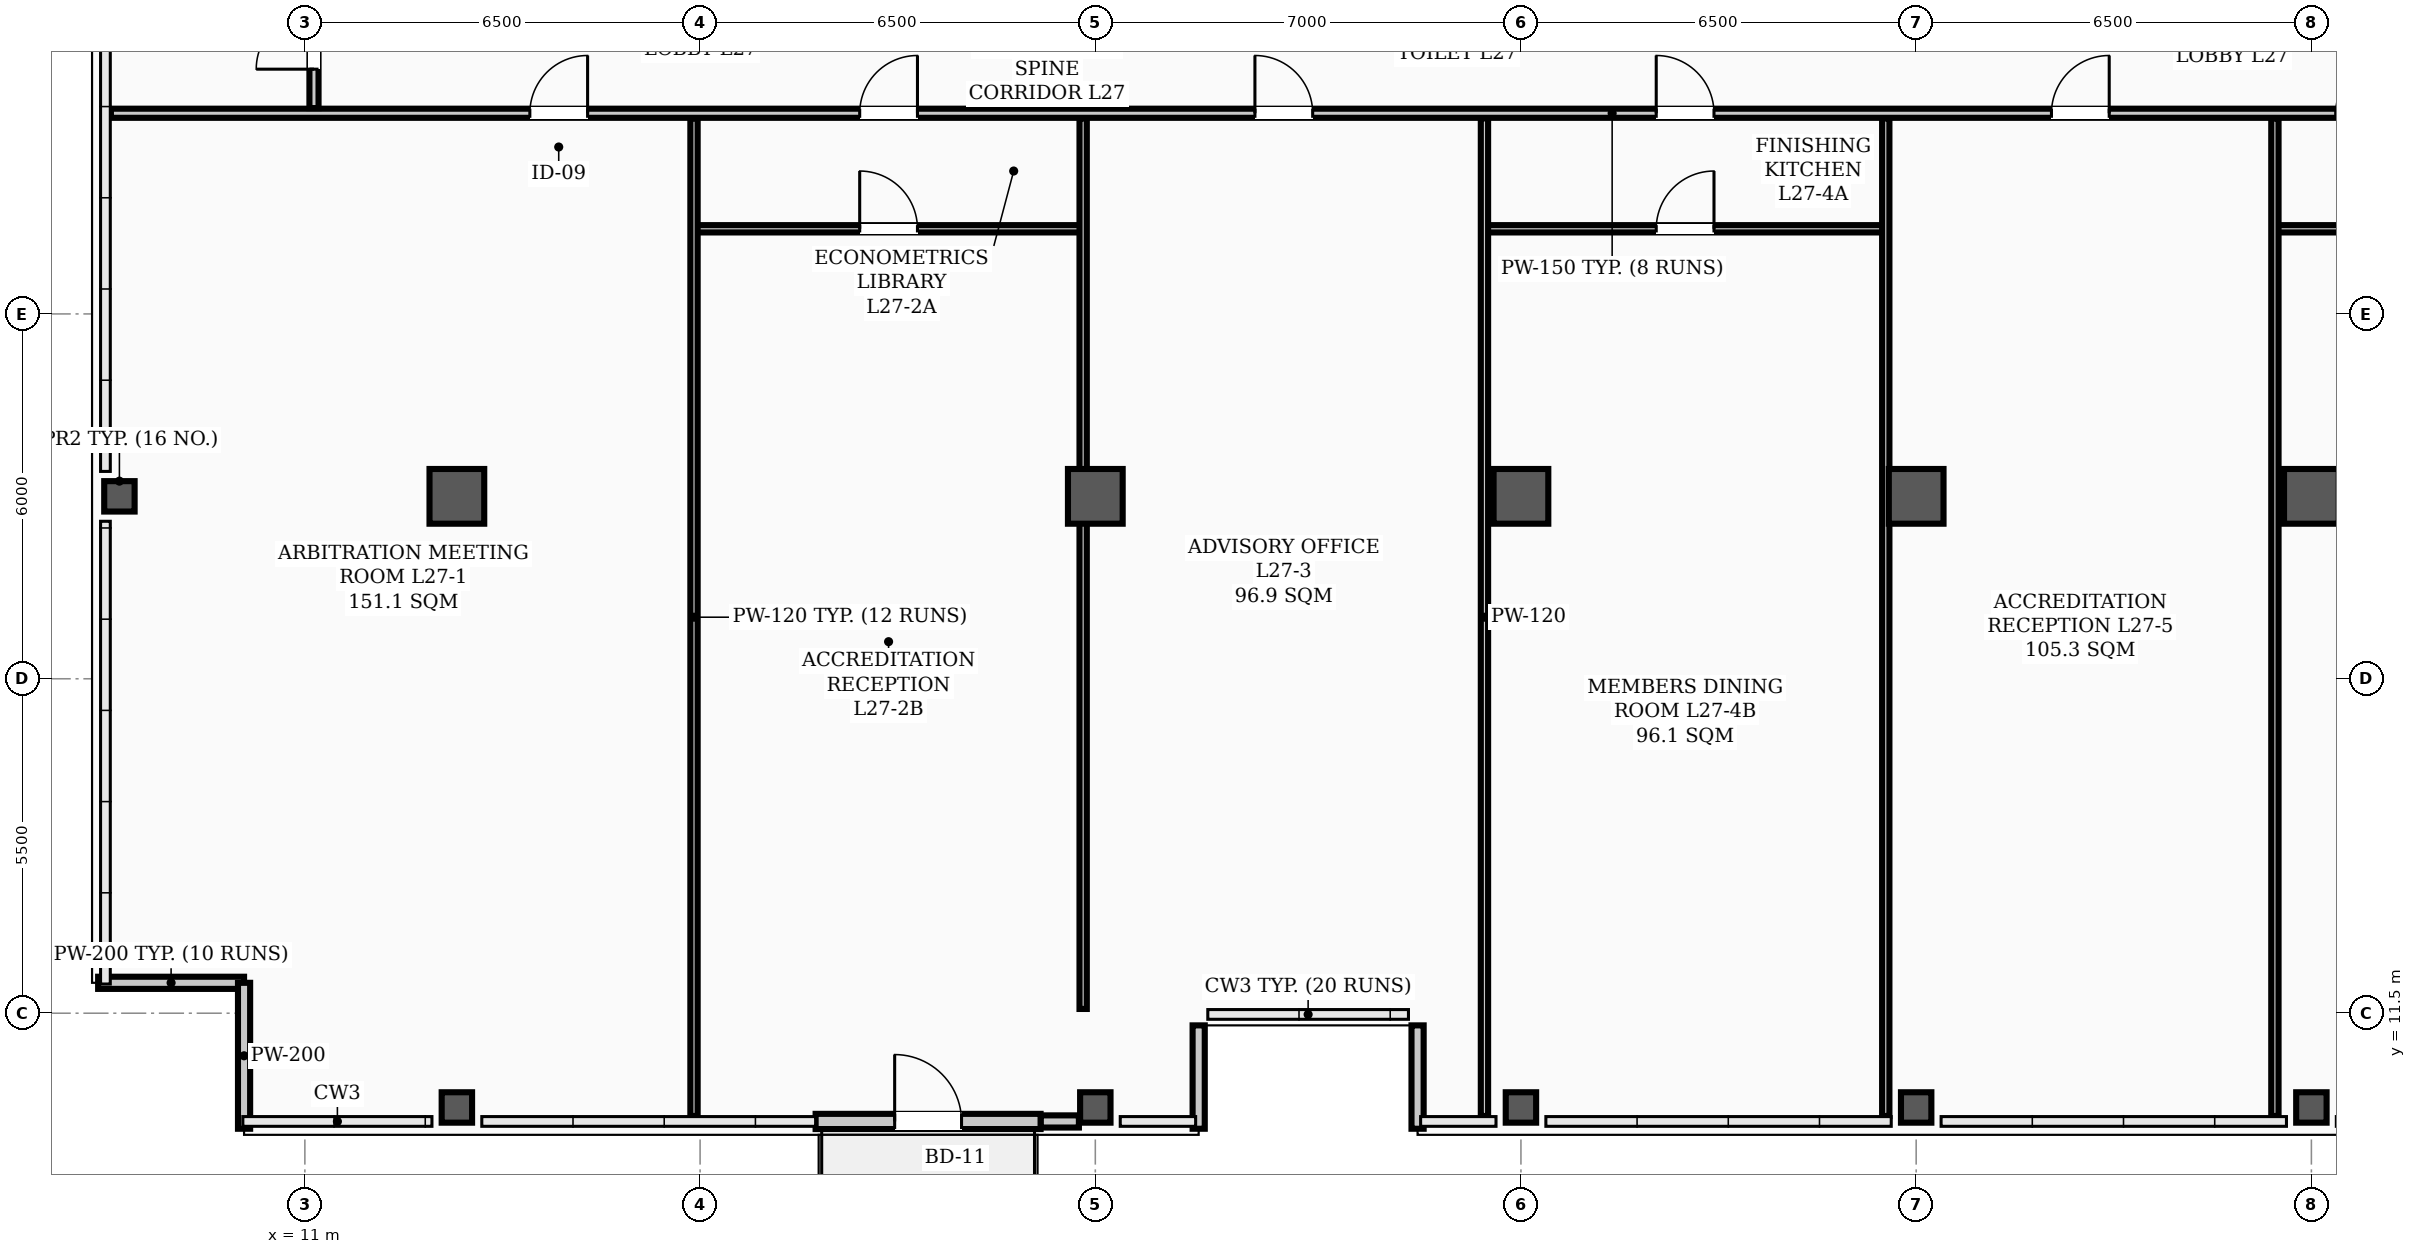
"""IFC4 building model, lengths in metres.
Left out: names, types, materials, properties, quantities, classifications, styles, units other than length and angle.
Written with IfcOpenShell. Run it as: python <this file> out.ifc"""

import sys

from ifc_helpers import new_model, si_unit, direction, frame, frame_2d, origin, origin_2d, place, context, subcontext, project, spatial, rectangle, hollow_rectangle, extrude, element, fill, save


model = new_model("IFC4")
c1 = context("Model", 3, precision=1e-05, world=origin(), true_north=direction((0.0, 1.0)))
c2 = subcontext(c1, "Body", "Model", "MODEL_VIEW")
j1 = project(units=[si_unit("LENGTHUNIT", "METRE"), si_unit("PLANEANGLEUNIT", "RADIAN")], contexts=[c1])
p1 = place(None, origin())
s1 = spatial("IfcSite", under=j1, at=p1, CompositionType="ELEMENT")
p2 = place(p1, origin())
s2 = spatial("IfcBuilding", under=s1, at=p2, CompositionType="ELEMENT")
p3 = place(p2, frame((0.0, 0.0, 111.0)))
s3 = spatial("IfcBuildingStorey", under=s2, at=p3, CompositionType="ELEMENT", Elevation=111.0)
for number, where, z_axis, x_axis in (
    (1, (13.5, 20.0, 0.0), (0.0, 0.0, 1.0), (1.0, 0.0, 0.0)),
    (2, (24.0, 20.0, 0.0), (0.0, 0.0, 1.0), (1.0, 0.0, 0.0)),
    (3, (31.0, 20.0, 0.0), (0.0, 0.0, 1.0), (1.0, 0.0, 0.0)),
    (4, (37.5, 20.0, 0.0), (0.0, 0.0, 1.0), (1.0, 0.0, 0.0)),
    (5, (44.0, 20.0, 0.0), (0.0, 0.0, 1.0), (1.0, 0.0, 0.0)),
):
    element("IfcColumn", number, at=place(p3, frame(where, z_axis=z_axis, x_axis=x_axis)), inside=s3, PredefinedType="COLUMN", context=c2, shape_type="SweptSolid", body=[
        extrude(hollow_rectangle(XDim=0.9, YDim=0.9, WallThickness=0.035, InnerFilletRadius=0.017, OuterFilletRadius=0.052, at=origin_2d()), origin(), (0.0, 0.0, 1.0), 3.9),
    ])
p4 = place(p3, frame((7.95, 20.0, 0.0), z_axis=(0.0, 0.0, 1.0), x_axis=(1.0, 0.0, 0.0)))
e6 = element("IfcColumn", 6, at=p4, inside=s3, PredefinedType="COLUMN", context=c2, shape_type="SweptSolid", body=[
    extrude(hollow_rectangle(XDim=0.5, YDim=0.5, WallThickness=0.024, InnerFilletRadius=0.012, OuterFilletRadius=0.036, at=origin_2d()), origin(), (0.0, 0.0, 1.0), 3.9),
])
for number, where, z_axis, x_axis in (
    (7, (13.5, 9.95, 0.0), (0.0, 0.0, 1.0), (1.0, 0.0, 0.0)),
    (8, (24.0, 9.95, 0.0), (0.0, 0.0, 1.0), (1.0, 0.0, 0.0)),
    (9, (31.0, 9.95, 0.0), (0.0, 0.0, 1.0), (1.0, 0.0, 0.0)),
    (10, (37.5, 9.95, 0.0), (0.0, 0.0, 1.0), (1.0, 0.0, 0.0)),
    (11, (44.0, 9.95, 0.0), (0.0, 0.0, 1.0), (1.0, 0.0, 0.0)),
):
    element("IfcColumn", number, at=place(p3, frame(where, z_axis=z_axis, x_axis=x_axis)), inside=s3, PredefinedType="COLUMN", context=c2, shape_type="SweptSolid", body=[
        extrude(hollow_rectangle(XDim=0.5, YDim=0.5, WallThickness=0.024, InnerFilletRadius=0.012, OuterFilletRadius=0.036, at=origin_2d()), origin(), (0.0, 0.0, 1.0), 3.66),
    ])
p5 = place(p3, frame((23.1, 9.72, 0.0), z_axis=(0.0, 0.0, 1.0), x_axis=(1.0, 0.0, 0.0)))
e12 = element("IfcWall", 12, at=p5, inside=s3, PredefinedType="PARAPET", context=c2, shape_type="SweptSolid", body=[
    extrude(rectangle(XDim=0.63, YDim=0.2, at=frame_2d((0.315, 0.0))), origin(), (0.0, 0.0, 1.0), 1.2),
])
for number, where, z_axis, x_axis in (
    (13, (7.6, 12.0, 0.0), (0.0, 0.0, 1.0), (1.0, 0.0, 0.0)),
    (14, (10.0, 12.0, 0.0), (0.0, 0.0, 1.0), (0.0, -1.0, 0.0)),
):
    element("IfcWall", number, at=place(p3, frame(where, z_axis=z_axis, x_axis=x_axis)), inside=s3, PredefinedType="PARAPET", context=c2, shape_type="SweptSolid", body=[
        extrude(rectangle(XDim=2.4, YDim=0.2, at=frame_2d((1.2, 0.0))), origin(), (0.0, 0.0, 1.0), 1.2),
    ])
for number, where, z_axis, x_axis in (
    (15, (25.7, 9.6, 0.0), (0.0, 0.0, 1.0), (0.0, 1.0, 0.0)),
    (16, (29.3, 11.3, 0.0), (0.0, 0.0, 1.0), (0.0, -1.0, 0.0)),
):
    element("IfcWall", number, at=place(p3, frame(where, z_axis=z_axis, x_axis=x_axis)), inside=s3, PredefinedType="PARAPET", context=c2, shape_type="SweptSolid", body=[
        extrude(rectangle(XDim=1.7, YDim=0.2, at=frame_2d((0.85, 0.0))), origin(), (0.0, 0.0, 1.0), 1.2),
    ])
p6 = place(p3, frame((19.4, 9.72, 0.0), z_axis=(0.0, 0.0, 1.0), x_axis=(1.0, 0.0, 0.0)))
e17 = element("IfcWall", 17, at=p6, inside=s3, PredefinedType="STANDARD", context=c2, shape_type="SweptSolid", body=[
    extrude(rectangle(XDim=3.7, YDim=0.25, at=frame_2d((1.85, 0.0))), origin(), (0.0, 0.0, 1.0), 2.22),
])
p7 = place(p6, frame((1.3, 0.0, 0.0)))
e18 = element("IfcOpeningElement", 18, at=p7, cuts=e17, PredefinedType="OPENING", context=c2, shape_type="SweptSolid", body=[
    extrude(rectangle(XDim=1.1, YDim=2.2, at=frame_2d((0.55, 1.1))), frame((0.0, 0.135, 0.0), z_axis=(0.0, -1.0, 0.0), x_axis=(1.0, 0.0, 0.0)), (0.0, 0.0, 1.0), 0.27),
])
p8 = place(p3, frame((7.81, 26.3, 0.0), z_axis=(0.0, 0.0, 1.0), x_axis=(1.0, 0.0, 0.0)))
e19 = element("IfcWall", 19, at=p8, inside=s3, PredefinedType="PARTITIONING", context=c2, shape_type="SweptSolid", body=[
    extrude(rectangle(XDim=49.38, YDim=0.15, at=frame_2d((24.69, 0.0))), origin(), (0.0, 0.0, 1.0), 2.24),
])
p9 = place(p8, frame((6.89, 0.0, 0.0)))
e20 = element("IfcOpeningElement", 20, at=p9, cuts=e19, PredefinedType="OPENING", context=c2, shape_type="SweptSolid", body=[
    extrude(rectangle(XDim=0.95, YDim=2.08, at=frame_2d((0.475, 1.04))), frame((0.0, 0.085, 0.0), z_axis=(0.0, -1.0, 0.0), x_axis=(1.0, 0.0, 0.0)), (0.0, 0.0, 1.0), 0.17),
])
p10 = place(p8, frame((12.315, 0.0, 0.0)))
e21 = element("IfcOpeningElement", 21, at=p10, cuts=e19, PredefinedType="OPENING", context=c2, shape_type="SweptSolid", body=[
    extrude(rectangle(XDim=0.95, YDim=2.08, at=frame_2d((0.475, 1.04))), frame((0.0, 0.085, 0.0), z_axis=(0.0, -1.0, 0.0), x_axis=(1.0, 0.0, 0.0)), (0.0, 0.0, 1.0), 0.17),
])
p11 = place(p8, frame((18.815, 0.0, 0.0)))
e22 = element("IfcOpeningElement", 22, at=p11, cuts=e19, PredefinedType="OPENING", context=c2, shape_type="SweptSolid", body=[
    extrude(rectangle(XDim=0.95, YDim=2.08, at=frame_2d((0.475, 1.04))), frame((0.0, 0.085, 0.0), z_axis=(0.0, -1.0, 0.0), x_axis=(1.0, 0.0, 0.0)), (0.0, 0.0, 1.0), 0.17),
])
p12 = place(p8, frame((25.415, 0.0, 0.0)))
e23 = element("IfcOpeningElement", 23, at=p12, cuts=e19, PredefinedType="OPENING", context=c2, shape_type="SweptSolid", body=[
    extrude(rectangle(XDim=0.95, YDim=2.08, at=frame_2d((0.475, 1.04))), frame((0.0, 0.085, 0.0), z_axis=(0.0, -1.0, 0.0), x_axis=(1.0, 0.0, 0.0)), (0.0, 0.0, 1.0), 0.17),
])
p13 = place(p8, frame((31.915, 0.0, 0.0)))
e24 = element("IfcOpeningElement", 24, at=p13, cuts=e19, PredefinedType="OPENING", context=c2, shape_type="SweptSolid", body=[
    extrude(rectangle(XDim=0.95, YDim=2.08, at=frame_2d((0.475, 1.04))), frame((0.0, 0.085, 0.0), z_axis=(0.0, -1.0, 0.0), x_axis=(1.0, 0.0, 0.0)), (0.0, 0.0, 1.0), 0.17),
])
p14 = place(p8, frame((36.59, 0.0, 0.0)))
e25 = element("IfcOpeningElement", 25, at=p14, cuts=e19, PredefinedType="OPENING", context=c2, shape_type="SweptSolid", body=[
    extrude(rectangle(XDim=0.95, YDim=2.08, at=frame_2d((0.475, 1.04))), frame((0.0, 0.085, 0.0), z_axis=(0.0, -1.0, 0.0), x_axis=(1.0, 0.0, 0.0)), (0.0, 0.0, 1.0), 0.17),
])
p15 = place(p3, frame((17.4, 24.4, 0.0), z_axis=(0.0, 0.0, 1.0), x_axis=(1.0, 0.0, 0.0)))
e26 = element("IfcWall", 26, at=p15, inside=s3, PredefinedType="PARTITIONING", context=c2, shape_type="SweptSolid", body=[
    extrude(rectangle(XDim=6.4, YDim=0.12, at=frame_2d((3.2, 0.0))), origin(), (0.0, 0.0, 1.0), 2.24),
])
p16 = place(p15, frame((2.725, 0.0, 0.0)))
e27 = element("IfcOpeningElement", 27, at=p16, cuts=e26, PredefinedType="OPENING", context=c2, shape_type="SweptSolid", body=[
    extrude(rectangle(XDim=0.95, YDim=2.08, at=frame_2d((0.475, 1.04))), frame((0.0, 0.07, 0.0), z_axis=(0.0, -1.0, 0.0), x_axis=(1.0, 0.0, 0.0)), (0.0, 0.0, 1.0), 0.14),
])
p17 = place(p3, frame((30.4, 24.4, 0.0), z_axis=(0.0, 0.0, 1.0), x_axis=(1.0, 0.0, 0.0)))
e28 = element("IfcWall", 28, at=p17, inside=s3, PredefinedType="PARTITIONING", context=c2, shape_type="SweptSolid", body=[
    extrude(rectangle(XDim=6.6, YDim=0.12, at=frame_2d((3.3, 0.0))), origin(), (0.0, 0.0, 1.0), 2.24),
])
p18 = place(p17, frame((2.825, 0.0, 0.0)))
e29 = element("IfcOpeningElement", 29, at=p18, cuts=e28, PredefinedType="OPENING", context=c2, shape_type="SweptSolid", body=[
    extrude(rectangle(XDim=0.95, YDim=2.08, at=frame_2d((0.475, 1.04))), frame((0.0, 0.07, 0.0), z_axis=(0.0, -1.0, 0.0), x_axis=(1.0, 0.0, 0.0)), (0.0, 0.0, 1.0), 0.14),
])
p19 = place(p3, frame((43.4, 24.4, 0.0), z_axis=(0.0, 0.0, 1.0), x_axis=(1.0, 0.0, 0.0)))
e30 = element("IfcWall", 30, at=p19, inside=s3, PredefinedType="PARTITIONING", context=c2, shape_type="SweptSolid", body=[
    extrude(rectangle(XDim=13.79, YDim=0.12, at=frame_2d((6.895, 0.0))), origin(), (0.0, 0.0, 1.0), 2.24),
])
p20 = place(p19, frame((6.42, 0.0, 0.0)))
e31 = element("IfcOpeningElement", 31, at=p20, cuts=e30, PredefinedType="OPENING", context=c2, shape_type="SweptSolid", body=[
    extrude(rectangle(XDim=0.95, YDim=2.08, at=frame_2d((0.475, 1.04))), frame((0.0, 0.07, 0.0), z_axis=(0.0, -1.0, 0.0), x_axis=(1.0, 0.0, 0.0)), (0.0, 0.0, 1.0), 0.14),
])
p21 = place(p3, frame((11.15, 26.385, 0.0), z_axis=(0.0, 0.0, 1.0), x_axis=(0.0, 1.0, 0.0)))
e32 = element("IfcWall", 32, at=p21, inside=s3, PredefinedType="PARTITIONING", context=c2, shape_type="SweptSolid", body=[
    extrude(rectangle(XDim=11.83, YDim=0.15, at=frame_2d((5.915, 0.0))), origin(), (0.0, 0.0, 1.0), 2.24),
])
p22 = place(p21, frame((0.64, 0.0, 0.0)))
e33 = element("IfcOpeningElement", 33, at=p22, cuts=e32, PredefinedType="OPENING", context=c2, shape_type="SweptSolid", body=[
    extrude(rectangle(XDim=0.95, YDim=2.08, at=frame_2d((0.475, 1.04))), frame((0.0, 0.085, 0.0), z_axis=(0.0, -1.0, 0.0), x_axis=(1.0, 0.0, 0.0)), (0.0, 0.0, 1.0), 0.17),
])
p23 = place(p21, frame((8.29, 0.0, 0.0)))
e34 = element("IfcOpeningElement", 34, at=p23, cuts=e32, PredefinedType="OPENING", context=c2, shape_type="SweptSolid", body=[
    extrude(rectangle(XDim=0.95, YDim=2.08, at=frame_2d((0.475, 1.04))), frame((0.0, 0.085, 0.0), z_axis=(0.0, -1.0, 0.0), x_axis=(1.0, 0.0, 0.0)), (0.0, 0.0, 1.0), 0.17),
])
p24 = place(p3, frame((17.4, 9.81, 0.0), z_axis=(0.0, 0.0, 1.0), x_axis=(0.0, 1.0, 0.0)))
e35 = element("IfcWall", 35, at=p24, inside=s3, PredefinedType="PARTITIONING", context=c2, shape_type="SweptSolid", body=[
    extrude(rectangle(XDim=16.405, YDim=0.12, at=frame_2d((8.203, 0.0))), origin(), (0.0, 0.0, 1.0), 2.24),
])
p25 = place(p3, frame((23.8, 11.57, 0.0), z_axis=(0.0, 0.0, 1.0), x_axis=(0.0, 1.0, 0.0)))
e36 = element("IfcWall", 36, at=p25, inside=s3, PredefinedType="PARTITIONING", context=c2, shape_type="SweptSolid", body=[
    extrude(rectangle(XDim=14.645, YDim=0.12, at=frame_2d((7.323, 0.0))), origin(), (0.0, 0.0, 1.0), 2.24),
])
for number, where, z_axis, x_axis in (
    (37, (30.4, 9.81, 0.0), (0.0, 0.0, 1.0), (0.0, 1.0, 0.0)),
    (38, (37.0, 9.81, 0.0), (0.0, 0.0, 1.0), (0.0, 1.0, 0.0)),
    (39, (43.4, 9.81, 0.0), (0.0, 0.0, 1.0), (0.0, 1.0, 0.0)),
):
    element("IfcWall", number, at=place(p3, frame(where, z_axis=z_axis, x_axis=x_axis)), inside=s3, PredefinedType="PARTITIONING", context=c2, shape_type="SweptSolid", body=[
        extrude(rectangle(XDim=16.405, YDim=0.12, at=frame_2d((8.203, 0.0))), origin(), (0.0, 0.0, 1.0), 2.24),
    ])
p26 = place(p7, origin())
e40 = element("IfcDoor", 40, at=p26, inside=s3, OperationType="SINGLE_SWING_LEFT", PredefinedType="DOOR", context=c2, shape_type="SweptSolid", body=[
    extrude(rectangle(XDim=1.1, YDim=2.2, at=frame_2d((0.55, 1.1))), frame((0.0, 0.025, 0.0), z_axis=(0.0, -1.0, 0.0), x_axis=(1.0, 0.0, 0.0)), (0.0, 0.0, 1.0), 0.05),
])
fill(e18, e40)
p27 = place(p9, origin())
e41 = element("IfcDoor", 41, at=p27, inside=s3, OperationType="SINGLE_SWING_RIGHT", PredefinedType="DOOR", context=c2, shape_type="SweptSolid", body=[
    extrude(rectangle(XDim=0.95, YDim=2.08, at=frame_2d((0.475, 1.04))), frame((0.0, 0.025, 0.0), z_axis=(0.0, -1.0, 0.0), x_axis=(1.0, 0.0, 0.0)), (0.0, 0.0, 1.0), 0.05),
])
fill(e20, e41)
p28 = place(p16, origin())
e42 = element("IfcDoor", 42, at=p28, inside=s3, OperationType="SINGLE_SWING_LEFT", PredefinedType="DOOR", context=c2, shape_type="SweptSolid", body=[
    extrude(rectangle(XDim=0.95, YDim=2.08, at=frame_2d((0.475, 1.04))), frame((0.0, 0.025, 0.0), z_axis=(0.0, -1.0, 0.0), x_axis=(1.0, 0.0, 0.0)), (0.0, 0.0, 1.0), 0.05),
])
fill(e27, e42)
p29 = place(p10, origin())
e43 = element("IfcDoor", 43, at=p29, inside=s3, OperationType="SINGLE_SWING_RIGHT", PredefinedType="DOOR", context=c2, shape_type="SweptSolid", body=[
    extrude(rectangle(XDim=0.95, YDim=2.08, at=frame_2d((0.475, 1.04))), frame((0.0, 0.025, 0.0), z_axis=(0.0, -1.0, 0.0), x_axis=(1.0, 0.0, 0.0)), (0.0, 0.0, 1.0), 0.05),
])
fill(e21, e43)
p30 = place(p11, origin())
e44 = element("IfcDoor", 44, at=p30, inside=s3, OperationType="SINGLE_SWING_LEFT", PredefinedType="DOOR", context=c2, shape_type="SweptSolid", body=[
    extrude(rectangle(XDim=0.95, YDim=2.08, at=frame_2d((0.475, 1.04))), frame((0.0, 0.025, 0.0), z_axis=(0.0, -1.0, 0.0), x_axis=(1.0, 0.0, 0.0)), (0.0, 0.0, 1.0), 0.05),
])
fill(e22, e44)
p31 = place(p18, origin())
e45 = element("IfcDoor", 45, at=p31, inside=s3, OperationType="SINGLE_SWING_RIGHT", PredefinedType="DOOR", context=c2, shape_type="SweptSolid", body=[
    extrude(rectangle(XDim=0.95, YDim=2.08, at=frame_2d((0.475, 1.04))), frame((0.0, 0.025, 0.0), z_axis=(0.0, -1.0, 0.0), x_axis=(1.0, 0.0, 0.0)), (0.0, 0.0, 1.0), 0.05),
])
fill(e29, e45)
p32 = place(p12, origin())
e46 = element("IfcDoor", 46, at=p32, inside=s3, OperationType="SINGLE_SWING_LEFT", PredefinedType="DOOR", context=c2, shape_type="SweptSolid", body=[
    extrude(rectangle(XDim=0.95, YDim=2.08, at=frame_2d((0.475, 1.04))), frame((0.0, 0.025, 0.0), z_axis=(0.0, -1.0, 0.0), x_axis=(1.0, 0.0, 0.0)), (0.0, 0.0, 1.0), 0.05),
])
fill(e23, e46)
p33 = place(p13, origin())
e47 = element("IfcDoor", 47, at=p33, inside=s3, OperationType="SINGLE_SWING_RIGHT", PredefinedType="DOOR", context=c2, shape_type="SweptSolid", body=[
    extrude(rectangle(XDim=0.95, YDim=2.08, at=frame_2d((0.475, 1.04))), frame((0.0, 0.025, 0.0), z_axis=(0.0, -1.0, 0.0), x_axis=(1.0, 0.0, 0.0)), (0.0, 0.0, 1.0), 0.05),
])
fill(e24, e47)
p34 = place(p22, origin())
e48 = element("IfcDoor", 48, at=p34, inside=s3, OperationType="SINGLE_SWING_LEFT", PredefinedType="DOOR", context=c2, shape_type="SweptSolid", body=[
    extrude(rectangle(XDim=0.95, YDim=2.08, at=frame_2d((0.475, 1.04))), frame((0.0, 0.025, 0.0), z_axis=(0.0, -1.0, 0.0), x_axis=(1.0, 0.0, 0.0)), (0.0, 0.0, 1.0), 0.05),
])
fill(e33, e48)
save(model, sys.argv[1])
